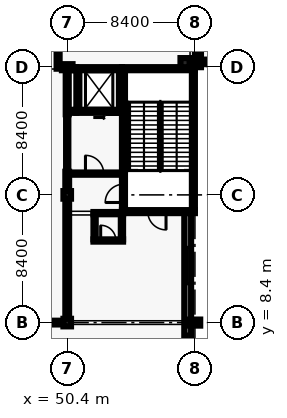
"""IFC4 building model, lengths in metres.
Left out: names, types, materials, properties, quantities, classifications, styles, units other than length and angle.
Written with IfcOpenShell. Run it as: python <this file> out.ifc"""

import sys

from ifc_helpers import new_model, si_unit, direction, frame, frame_2d, origin, origin_2d, place, context, subcontext, project, spatial, rectangle, extrude, element, fill, save


model = new_model("IFC4")
c1 = context("Model", 3, precision=1e-05, world=origin(), true_north=direction((0.0, 1.0)))
c2 = subcontext(c1, "Body", "Model", "MODEL_VIEW")
j1 = project(units=[si_unit("LENGTHUNIT", "METRE"), si_unit("PLANEANGLEUNIT", "RADIAN")], contexts=[c1])
p1 = place(None, origin())
s1 = spatial("IfcSite", under=j1, at=p1, CompositionType="ELEMENT")
p2 = place(p1, origin())
s2 = spatial("IfcBuilding", under=s1, at=p2, CompositionType="ELEMENT")
p3 = place(p2, frame((0.0, 0.0, 10.2)))
s3 = spatial("IfcBuildingStorey", under=s2, at=p3, CompositionType="ELEMENT", Elevation=10.2)
p4 = place(p3, frame((58.8, 15.7, 0.0), z_axis=(0.0, 0.0, 1.0), x_axis=(-1.0, 0.0, 0.0)))
e1 = element("IfcWall", 1, at=p4, inside=s3, PredefinedType="SHEAR", context=c2, shape_type="SweptSolid", body=[
    extrude(rectangle(XDim=4.8, YDim=0.2, at=frame_2d((2.4, 0.0))), origin(), (0.0, 0.0, 1.0), 4.8),
])
p5 = place(p4, frame((1.9, 0.0, 0.0)))
e2 = element("IfcOpeningElement", 2, at=p5, cuts=e1, PredefinedType="OPENING", context=c2, shape_type="SweptSolid", body=[
    extrude(rectangle(XDim=1.2, YDim=2.1, at=frame_2d((0.6, 1.05))), frame((0.0, 0.11, 0.0), z_axis=(0.0, -1.0, 0.0), x_axis=(1.0, 0.0, 0.0)), (0.0, 0.0, 1.0), 0.22),
])
p6 = place(p3, frame((54.0, 25.1, 0.0), z_axis=(0.0, 0.0, 1.0), x_axis=(1.0, 0.0, 0.0)))
e3 = element("IfcWall", 3, at=p6, inside=s3, PredefinedType="SHEAR", context=c2, shape_type="SweptSolid", body=[
    extrude(rectangle(XDim=4.8, YDim=0.2, at=frame_2d((2.4, 0.0))), origin(), (0.0, 0.0, 1.0), 4.8),
])
p7 = place(p3, frame((54.1, 15.8, 0.0), z_axis=(0.0, 0.0, 1.0), x_axis=(0.0, 1.0, 0.0)))
e4 = element("IfcWall", 4, at=p7, inside=s3, PredefinedType="SHEAR", context=c2, shape_type="SweptSolid", body=[
    extrude(rectangle(XDim=9.2, YDim=0.2, at=frame_2d((4.6, 0.0))), origin(), (0.0, 0.0, 1.0), 4.8),
])
p8 = place(p7, frame((0.5, 0.0, 0.0)))
e5 = element("IfcOpeningElement", 5, at=p8, cuts=e4, PredefinedType="OPENING", context=c2, shape_type="SweptSolid", body=[
    extrude(rectangle(XDim=1.2, YDim=2.1, at=frame_2d((0.6, 1.05))), frame((0.0, 0.11, 0.0), z_axis=(0.0, -1.0, 0.0), x_axis=(1.0, 0.0, 0.0)), (0.0, 0.0, 1.0), 0.22),
])
p9 = place(p3, frame((58.7, 25.0, 0.0), z_axis=(0.0, 0.0, 1.0), x_axis=(0.0, -1.0, 0.0)))
e6 = element("IfcWall", 6, at=p9, inside=s3, PredefinedType="SHEAR", context=c2, shape_type="SweptSolid", body=[
    extrude(rectangle(XDim=9.2, YDim=0.2, at=frame_2d((4.6, 0.0))), origin(), (0.0, 0.0, 1.0), 4.8),
])
p10 = place(p3, frame((54.0, 22.3, 0.0), z_axis=(0.0, 0.0, 1.0), x_axis=(-1.0, 0.0, 0.0)))
e7 = element("IfcWall", 7, at=p10, inside=s3, PredefinedType="SHEAR", context=c2, shape_type="SweptSolid", body=[
    extrude(rectangle(XDim=3.0, YDim=0.2, at=frame_2d((1.5, 0.0))), origin(), (0.0, 0.0, 1.0), 4.8),
])
p11 = place(p10, frame((0.95, 0.0, 0.0)))
e8 = element("IfcOpeningElement", 8, at=p11, cuts=e7, PredefinedType="OPENING", context=c2, shape_type="SweptSolid", body=[
    extrude(rectangle(XDim=1.1, YDim=2.1, at=frame_2d((0.55, 1.05))), frame((0.0, 0.11, 0.0), z_axis=(0.0, -1.0, 0.0), x_axis=(1.0, 0.0, 0.0)), (0.0, 0.0, 1.0), 0.22),
])
p12 = place(p3, frame((51.0, 25.1, 0.0), z_axis=(0.0, 0.0, 1.0), x_axis=(1.0, 0.0, 0.0)))
e9 = element("IfcWall", 9, at=p12, inside=s3, PredefinedType="SHEAR", context=c2, shape_type="SweptSolid", body=[
    extrude(rectangle(XDim=3.0, YDim=0.2, at=frame_2d((1.5, 0.0))), origin(), (0.0, 0.0, 1.0), 4.8),
])
for number, where, z_axis, x_axis in (
    (10, (51.1, 22.4, 0.0), (0.0, 0.0, 1.0), (0.0, 1.0, 0.0)),
    (11, (53.9, 25.0, 0.0), (0.0, 0.0, 1.0), (0.0, -1.0, 0.0)),
):
    element("IfcWall", number, at=place(p3, frame(where, z_axis=z_axis, x_axis=x_axis)), inside=s3, PredefinedType="SHEAR", context=c2, shape_type="SweptSolid", body=[
        extrude(rectangle(XDim=2.6, YDim=0.2, at=frame_2d((1.3, 0.0))), origin(), (0.0, 0.0, 1.0), 4.8),
    ])
p13 = place(p3, frame((59.0, 25.2, 0.0), z_axis=(0.0, 0.0, 1.0), x_axis=(0.0, 1.0, 0.0)))
e12 = element("IfcWall", 12, at=p13, inside=s3, PredefinedType="SHEAR", context=c2, shape_type="SweptSolid", body=[
    extrude(rectangle(XDim=8.175, YDim=0.4, at=frame_2d((4.087, 0.0))), origin(), (0.0, 0.0, 1.0), 4.8),
])
for number, where, z_axis, x_axis in (
    (13, (50.4, 8.4, 0.0), (0.0, 0.0, 1.0), (1.0, 0.0, 0.0)),
    (14, (50.4, 16.8, 0.0), (0.0, 0.0, 1.0), (1.0, 0.0, 0.0)),
):
    element("IfcColumn", number, at=place(p3, frame(where, z_axis=z_axis, x_axis=x_axis)), inside=s3, PredefinedType="COLUMN", context=c2, shape_type="SweptSolid", body=[
        extrude(rectangle(XDim=0.5, YDim=0.5, at=origin_2d()), origin(), (0.0, 0.0, 1.0), 4.8),
    ])
for number, where, z_axis, x_axis in (
    (15, (50.4, 25.2, 0.0), (0.0, 0.0, 1.0), (1.0, 0.0, 0.0)),
    (16, (58.8, 8.4, 0.0), (0.0, 0.0, 1.0), (0.0, 1.0, 0.0)),
):
    element("IfcColumn", number, at=place(p3, frame(where, z_axis=z_axis, x_axis=x_axis)), inside=s3, PredefinedType="COLUMN", context=c2, shape_type="SweptSolid", body=[
        extrude(rectangle(XDim=0.7, YDim=0.4, at=origin_2d()), origin(), (0.0, 0.0, 1.0), 4.8),
    ])
p14 = place(p3, frame((58.15, 25.5, 0.0), z_axis=(0.0, 0.0, 1.0), x_axis=(1.0, 0.0, 0.0)))
e17 = element("IfcColumn", 17, at=p14, inside=s3, PredefinedType="COLUMN", context=c2, shape_type="SweptSolid", body=[
    extrude(rectangle(XDim=0.6, YDim=0.6, at=origin_2d()), origin(), (0.0, 0.0, 1.0), 4.8),
])
p15 = place(p3, frame((51.0, 22.3, 0.0), z_axis=(0.0, 0.0, 1.0), x_axis=(-1.0, 0.0, 0.0)))
e18 = element("IfcWall", 18, at=p15, inside=s3, PredefinedType="SHEAR", context=c2, shape_type="SweptSolid", body=[
    extrude(rectangle(XDim=0.5, YDim=0.2, at=frame_2d((0.25, 0.0))), origin(), (0.0, 0.0, 1.0), 4.8),
])
p16 = place(p3, frame((50.75, 25.1, 0.0), z_axis=(0.0, 0.0, 1.0), x_axis=(1.0, 0.0, 0.0)))
e19 = element("IfcWall", 19, at=p16, inside=s3, PredefinedType="SHEAR", context=c2, shape_type="SweptSolid", body=[
    extrude(rectangle(XDim=0.25, YDim=0.2, at=frame_2d((0.125, 0.0))), origin(), (0.0, 0.0, 1.0), 4.8),
])
p17 = place(p3, frame((58.325, 15.6, 0.0), z_axis=(0.0, 0.0, 1.0), x_axis=(0.0, -1.0, 0.0)))
e20 = element("IfcWall", 20, at=p17, inside=s3, PredefinedType="SOLIDWALL", context=c2, shape_type="SweptSolid", body=[
    extrude(rectangle(XDim=15.0, YDim=0.45, at=frame_2d((7.5, 0.0))), origin(), (0.0, 0.0, 1.0), 4.5),
])
p18 = place(p17, frame((11.55, 0.0, 0.9)))
e21 = element("IfcOpeningElement", 21, at=p18, cuts=e20, PredefinedType="OPENING", context=c2, shape_type="SweptSolid", body=[
    extrude(rectangle(XDim=2.4, YDim=1.5, at=frame_2d((1.2, 0.75))), frame((0.0, 0.235, 0.0), z_axis=(0.0, -1.0, 0.0), x_axis=(1.0, 0.0, 0.0)), (0.0, 0.0, 1.0), 0.47),
])
p19 = place(p17, frame((7.95, 0.0, 0.9)))
e22 = element("IfcOpeningElement", 22, at=p19, cuts=e20, PredefinedType="OPENING", context=c2, shape_type="SweptSolid", body=[
    extrude(rectangle(XDim=1.8, YDim=1.5, at=frame_2d((0.9, 0.75))), frame((0.0, 0.235, 0.0), z_axis=(0.0, -1.0, 0.0), x_axis=(1.0, 0.0, 0.0)), (0.0, 0.0, 1.0), 0.47),
])
p20 = place(p17, frame((2.25, 0.0, 0.9)))
e23 = element("IfcOpeningElement", 23, at=p20, cuts=e20, PredefinedType="OPENING", context=c2, shape_type="SweptSolid", body=[
    extrude(rectangle(XDim=2.4, YDim=1.5, at=frame_2d((1.2, 0.75))), frame((0.0, 0.235, 0.0), z_axis=(0.0, -1.0, 0.0), x_axis=(1.0, 0.0, 0.0)), (0.0, 0.0, 1.0), 0.47),
])
p21 = place(p3, frame((62.4, 25.55, 0.0), z_axis=(0.0, 0.0, 1.0), x_axis=(-1.0, 0.0, 0.0)))
e24 = element("IfcWall", 24, at=p21, inside=s3, PredefinedType="SOLIDWALL", context=c2, shape_type="SweptSolid", body=[
    extrude(rectangle(XDim=3.2, YDim=0.3, at=frame_2d((1.6, 0.0))), origin(), (0.0, 0.0, 1.0), 4.8),
])
p22 = place(p21, frame((0.3, 0.0, 0.9)))
e25 = element("IfcOpeningElement", 25, at=p22, cuts=e24, PredefinedType="OPENING", context=c2, shape_type="SweptSolid", body=[
    extrude(rectangle(XDim=2.4, YDim=1.8, at=frame_2d((1.2, 0.9))), frame((0.0, 0.16, 0.0), z_axis=(0.0, -1.0, 0.0), x_axis=(1.0, 0.0, 0.0)), (0.0, 0.0, 1.0), 0.32),
])
p23 = place(p3, frame((37.675, 8.4, 0.0), z_axis=(0.0, 0.0, 1.0), x_axis=(1.0, 0.0, 0.0)))
e26 = element("IfcWall", 26, at=p23, inside=s3, PredefinedType="PARTITIONING", context=c2, shape_type="SweptSolid", body=[
    extrude(rectangle(XDim=12.85, YDim=0.25, at=frame_2d((6.425, 0.0))), origin(), (0.0, 0.0, 1.0), 3.8),
])
p24 = place(p23, frame((5.825, 0.0, 0.0)))
e27 = element("IfcOpeningElement", 27, at=p24, cuts=e26, PredefinedType="OPENING", context=c2, shape_type="SweptSolid", body=[
    extrude(rectangle(XDim=1.2, YDim=2.1, at=frame_2d((0.6, 1.05))), frame((0.0, 0.135, 0.0), z_axis=(0.0, -1.0, 0.0), x_axis=(1.0, 0.0, 0.0)), (0.0, 0.0, 1.0), 0.27),
])
p25 = place(p3, frame((50.4, 8.525, 0.0), z_axis=(0.0, 0.0, 1.0), x_axis=(0.0, 1.0, 0.0)))
e28 = element("IfcWall", 28, at=p25, inside=s3, PredefinedType="PARTITIONING", context=c2, shape_type="SweptSolid", body=[
    extrude(rectangle(XDim=9.8, YDim=0.25, at=frame_2d((4.9, 0.0))), origin(), (0.0, 0.0, 1.0), 3.8),
])
p26 = place(p3, frame((49.8, 25.1, 0.0), z_axis=(0.0, 0.0, 1.0), x_axis=(0.0, 1.0, 0.0)))
e29 = element("IfcWall", 29, at=p26, inside=s3, PredefinedType="SHEAR", context=c2, shape_type="SweptSolid", body=[
    extrude(rectangle(XDim=3.0, YDim=0.2, at=frame_2d((1.5, 0.0))), origin(), (0.0, 0.0, 1.0), 4.5),
])
p27 = place(p3, frame((50.4, 22.1, 0.0), z_axis=(0.0, 0.0, 1.0), x_axis=(0.0, 1.0, 0.0)))
e30 = element("IfcWall", 30, at=p27, inside=s3, PredefinedType="SHEAR", context=c2, shape_type="SweptSolid", body=[
    extrude(rectangle(XDim=3.2, YDim=0.2, at=frame_2d((1.6, 0.0))), origin(), (0.0, 0.0, 1.0), 4.5),
])
p28 = place(p3, frame((52.125, 13.8, 0.0), z_axis=(0.0, 0.0, 1.0), x_axis=(1.0, 0.0, 0.0)))
e31 = element("IfcWall", 31, at=p28, inside=s3, PredefinedType="PARTITIONING", context=c2, shape_type="SweptSolid", body=[
    extrude(rectangle(XDim=1.95, YDim=0.15, at=frame_2d((0.975, 0.0))), origin(), (0.0, 0.0, 1.0), 4.5),
])
p29 = place(p28, frame((0.475, 0.0, 0.0)))
e32 = element("IfcOpeningElement", 32, at=p29, cuts=e31, PredefinedType="OPENING", context=c2, shape_type="SweptSolid", body=[
    extrude(rectangle(XDim=1.0, YDim=2.1, at=frame_2d((0.5, 1.05))), frame((0.0, 0.085, 0.0), z_axis=(0.0, -1.0, 0.0), x_axis=(1.0, 0.0, 0.0)), (0.0, 0.0, 1.0), 0.17),
])
p30 = place(p3, frame((52.125, 15.6, 0.0), z_axis=(0.0, 0.0, 1.0), x_axis=(1.0, 0.0, 0.0)))
e33 = element("IfcWall", 33, at=p30, inside=s3, PredefinedType="PARTITIONING", context=c2, shape_type="SweptSolid", body=[
    extrude(rectangle(XDim=1.95, YDim=0.15, at=frame_2d((0.975, 0.0))), origin(), (0.0, 0.0, 1.0), 4.5),
])
p31 = place(p3, frame((50.525, 18.2, 0.0), z_axis=(0.0, 0.0, 1.0), x_axis=(1.0, 0.0, 0.0)))
e34 = element("IfcWall", 34, at=p31, inside=s3, PredefinedType="SOLIDWALL", context=c2, shape_type="SweptSolid", body=[
    extrude(rectangle(XDim=3.475, YDim=0.15, at=frame_2d((1.738, 0.0))), origin(), (0.0, 0.0, 1.0), 3.8),
])
p32 = place(p31, frame((1.075, 0.0, 0.0)))
e35 = element("IfcOpeningElement", 35, at=p32, cuts=e34, PredefinedType="OPENING", context=c2, shape_type="SweptSolid", body=[
    extrude(rectangle(XDim=1.2, YDim=2.1, at=frame_2d((0.6, 1.05))), frame((0.0, 0.085, 0.0), z_axis=(0.0, -1.0, 0.0), x_axis=(1.0, 0.0, 0.0)), (0.0, 0.0, 1.0), 0.17),
])
for number, where, z_axis, x_axis in (
    (36, (52.2, 13.875, 0.0), (0.0, 0.0, 1.0), (0.0, 1.0, 0.0)),
    (37, (54.0, 13.875, 0.0), (0.0, 0.0, 1.0), (0.0, 1.0, 0.0)),
):
    element("IfcWall", number, at=place(p3, frame(where, z_axis=z_axis, x_axis=x_axis)), inside=s3, PredefinedType="PARTITIONING", context=c2, shape_type="SweptSolid", body=[
        extrude(rectangle(XDim=1.65, YDim=0.15, at=frame_2d((0.825, 0.0))), origin(), (0.0, 0.0, 1.0), 4.5),
    ])
p33 = place(p3, frame((50.4, 18.325, 0.0), z_axis=(0.0, 0.0, 1.0), x_axis=(0.0, 1.0, 0.0)))
e38 = element("IfcWall", 38, at=p33, inside=s3, PredefinedType="SOLIDWALL", context=c2, shape_type="SweptSolid", body=[
    extrude(rectangle(XDim=3.775, YDim=0.15, at=frame_2d((1.888, 0.0))), origin(), (0.0, 0.0, 1.0), 3.8),
])
p34 = place(p19, origin())
e39 = element("IfcWindow", 39, at=p34, inside=s3, PartitioningType="SINGLE_PANEL", PredefinedType="WINDOW", context=c2, shape_type="SweptSolid", body=[
    extrude(rectangle(XDim=1.8, YDim=1.5, at=frame_2d((0.9, 0.75))), frame((0.0, 0.03, 0.0), z_axis=(0.0, -1.0, 0.0), x_axis=(1.0, 0.0, 0.0)), (0.0, 0.0, 1.0), 0.06),
])
fill(e22, e39)
p35 = place(p20, origin())
e40 = element("IfcWindow", 40, at=p35, inside=s3, PartitioningType="SINGLE_PANEL", PredefinedType="WINDOW", context=c2, shape_type="SweptSolid", body=[
    extrude(rectangle(XDim=2.4, YDim=1.5, at=frame_2d((1.2, 0.75))), frame((0.0, 0.03, 0.0), z_axis=(0.0, -1.0, 0.0), x_axis=(1.0, 0.0, 0.0)), (0.0, 0.0, 1.0), 0.06),
])
fill(e23, e40)
p36 = place(p11, origin())
e41 = element("IfcDoor", 41, at=p36, inside=s3, OperationType="SLIDING_TO_LEFT", PredefinedType="DOOR", context=c2, shape_type="SweptSolid", body=[
    extrude(rectangle(XDim=1.1, YDim=2.1, at=frame_2d((0.55, 1.05))), frame((0.0, 0.025, 0.0), z_axis=(0.0, -1.0, 0.0), x_axis=(1.0, 0.0, 0.0)), (0.0, 0.0, 1.0), 0.05),
])
fill(e8, e41)
p37 = place(p5, origin())
e42 = element("IfcDoor", 42, at=p37, inside=s3, OperationType="SINGLE_SWING_LEFT", PredefinedType="DOOR", context=c2, shape_type="SweptSolid", body=[
    extrude(rectangle(XDim=1.2, YDim=2.1, at=frame_2d((0.6, 1.05))), frame((0.0, 0.025, 0.0), z_axis=(0.0, -1.0, 0.0), x_axis=(1.0, 0.0, 0.0)), (0.0, 0.0, 1.0), 0.05),
])
fill(e2, e42)
p38 = place(p8, origin())
e43 = element("IfcDoor", 43, at=p38, inside=s3, OperationType="SINGLE_SWING_LEFT", PredefinedType="DOOR", context=c2, shape_type="SweptSolid", body=[
    extrude(rectangle(XDim=1.2, YDim=2.1, at=frame_2d((0.6, 1.05))), frame((0.0, 0.025, 0.0), z_axis=(0.0, -1.0, 0.0), x_axis=(1.0, 0.0, 0.0)), (0.0, 0.0, 1.0), 0.05),
])
fill(e5, e43)
p39 = place(p29, origin())
e44 = element("IfcDoor", 44, at=p39, inside=s3, OperationType="SINGLE_SWING_RIGHT", PredefinedType="DOOR", context=c2, shape_type="SweptSolid", body=[
    extrude(rectangle(XDim=1.0, YDim=2.1, at=frame_2d((0.5, 1.05))), frame((0.0, 0.025, 0.0), z_axis=(0.0, -1.0, 0.0), x_axis=(1.0, 0.0, 0.0)), (0.0, 0.0, 1.0), 0.05),
])
fill(e32, e44)
p40 = place(p32, origin())
e45 = element("IfcDoor", 45, at=p40, inside=s3, OperationType="SINGLE_SWING_RIGHT", PredefinedType="DOOR", context=c2, shape_type="SweptSolid", body=[
    extrude(rectangle(XDim=1.2, YDim=2.1, at=frame_2d((0.6, 1.05))), frame((0.0, 0.025, 0.0), z_axis=(0.0, -1.0, 0.0), x_axis=(1.0, 0.0, 0.0)), (0.0, 0.0, 1.0), 0.05),
])
fill(e35, e45)
save(model, sys.argv[1])
